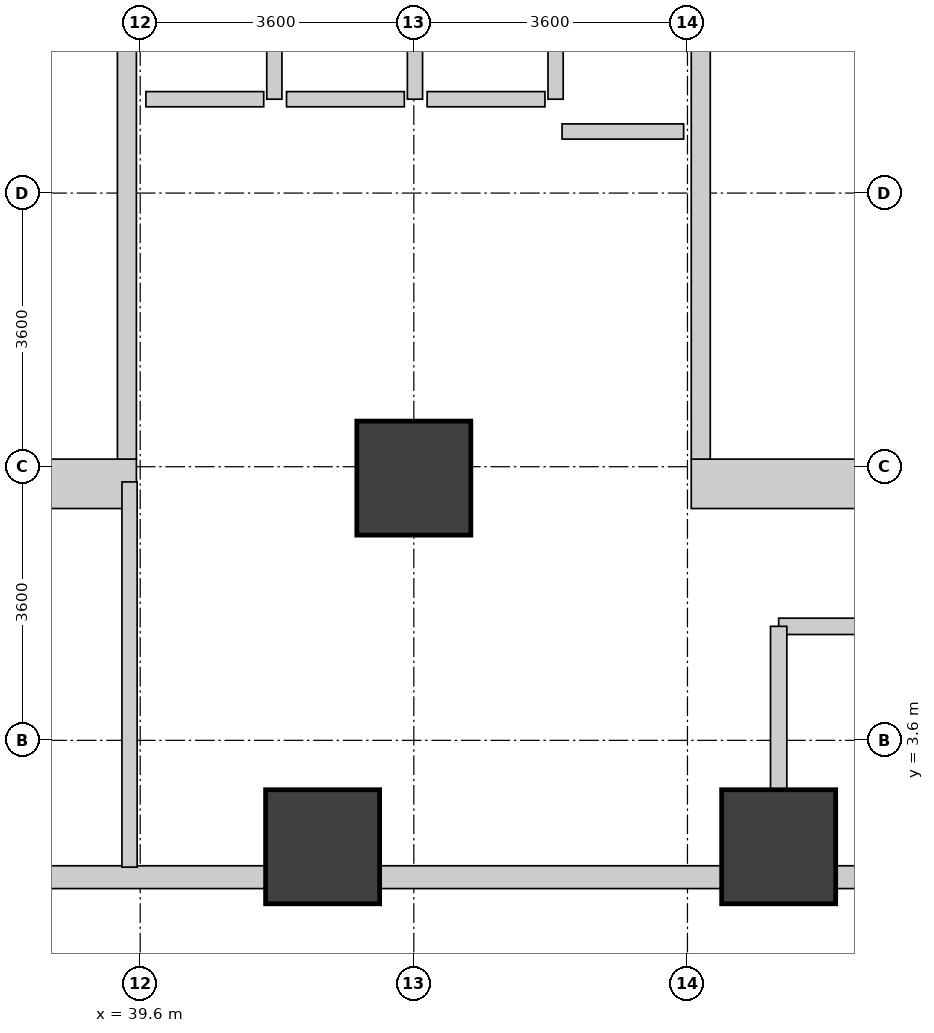
"""IFC4 building model, lengths in metres.
Left out: names, types, materials, properties, quantities, classifications, styles, units other than length and angle.
Written with IfcOpenShell. Run it as: python <this file> out.ifc"""

import sys

from ifc_helpers import new_model, si_unit, direction, frame, frame_2d, origin, origin_2d, place, context, subcontext, project, spatial, rectangle, extrude, source, transform, mapped, element, fill, save


model = new_model("IFC4")
c1 = context("Model", 3, precision=1e-05, world=origin(), true_north=direction((0.0, 1.0)))
c2 = subcontext(c1, "Body", "Model", "MODEL_VIEW")
j1 = project(units=[si_unit("LENGTHUNIT", "METRE"), si_unit("PLANEANGLEUNIT", "RADIAN")], contexts=[c1])
p1 = place(None, origin())
s1 = spatial("IfcSite", under=j1, at=p1, CompositionType="ELEMENT")
p2 = place(p1, origin())
s2 = spatial("IfcBuilding", under=s1, at=p2, CompositionType="ELEMENT")
p3 = place(p2, origin())
s3 = spatial("IfcBuildingStorey", under=s2, at=p3, CompositionType="ELEMENT", Elevation=0.0)
p4 = place(p3, frame((36.35, 6.975, 0.0), z_axis=(0.0, 0.0, 1.0), x_axis=(1.0, 0.0, 0.0)))
e1 = element("IfcWall", 1, at=p4, inside=s3, PredefinedType="SHEAR", context=c2, shape_type="SweptSolid", body=[
    extrude(rectangle(XDim=3.2, YDim=0.65, at=frame_2d((1.6, 0.0))), origin(), (0.0, 0.0, 1.0), 5.12),
])
p5 = place(p4, frame((0.85, 0.0, 0.0)))
e2 = element("IfcOpeningElement", 2, at=p5, cuts=e1, PredefinedType="OPENING", context=c2, shape_type="SweptSolid", body=[
    extrude(rectangle(XDim=1.1, YDim=2.08, at=frame_2d((0.55, 1.04))), frame((0.0, 0.335, 0.0), z_axis=(0.0, -1.0, 0.0), x_axis=(1.0, 0.0, 0.0)), (0.0, 0.0, 1.0), 0.67),
])
p6 = place(p3, frame((46.85, 6.975, 0.0), z_axis=(0.0, 0.0, 1.0), x_axis=(1.0, 0.0, 0.0)))
e3 = element("IfcWall", 3, at=p6, inside=s3, PredefinedType="SHEAR", context=c2, shape_type="SweptSolid", body=[
    extrude(rectangle(XDim=3.2, YDim=0.65, at=frame_2d((1.6, 0.0))), origin(), (0.0, 0.0, 1.0), 5.12),
])
p7 = place(p3, frame((39.425, 7.3, 0.0), z_axis=(0.0, 0.0, 1.0), x_axis=(0.0, 1.0, 0.0)))
e4 = element("IfcWall", 4, at=p7, inside=s3, PredefinedType="SHEAR", context=c2, shape_type="SweptSolid", body=[
    extrude(rectangle(XDim=7.0, YDim=0.25, at=frame_2d((3.5, 0.0))), origin(), (0.0, 0.0, 1.0), 5.12),
])
p8 = place(p7, frame((0.15, 0.0, 0.0)))
e5 = element("IfcOpeningElement", 5, at=p8, cuts=e4, PredefinedType="OPENING", context=c2, shape_type="SweptSolid", body=[
    extrude(rectangle(XDim=1.1, YDim=2.08, at=frame_2d((0.55, 1.04))), frame((0.0, 0.135, 0.0), z_axis=(0.0, -1.0, 0.0), x_axis=(1.0, 0.0, 0.0)), (0.0, 0.0, 1.0), 0.27),
])
p9 = place(p3, frame((46.975, 7.3, 0.0), z_axis=(0.0, 0.0, 1.0), x_axis=(0.0, 1.0, 0.0)))
e6 = element("IfcWall", 6, at=p9, inside=s3, PredefinedType="SHEAR", context=c2, shape_type="SweptSolid", body=[
    extrude(rectangle(XDim=7.0, YDim=0.25, at=frame_2d((3.5, 0.0))), origin(), (0.0, 0.0, 1.0), 5.12),
])
p10 = place(p9, frame((0.15, 0.0, 0.0)))
e7 = element("IfcOpeningElement", 7, at=p10, cuts=e6, PredefinedType="OPENING", context=c2, shape_type="SweptSolid", body=[
    extrude(rectangle(XDim=1.1, YDim=2.08, at=frame_2d((0.55, 1.04))), frame((0.0, 0.135, 0.0), z_axis=(0.0, -1.0, 0.0), x_axis=(1.0, 0.0, 0.0)), (0.0, 0.0, 1.0), 0.27),
])
m1 = source(origin(), c2, "Body", "SweptSolid", [
    extrude(rectangle(XDim=1.5, YDim=1.5, at=origin_2d()), origin(), (0.0, 0.0, 1.0), 5.4),
])
for number, where, z_axis, x_axis in (
    (8, (43.2, 7.05, 0.0), (0.0, 0.0, 1.0), (1.0, 0.0, 0.0)),
    (9, (48.0, 2.2, 0.0), (0.0, 0.0, 1.0), (1.0, 0.0, 0.0)),
    (10, (42.0, 2.2, 0.0), (0.0, 0.0, 1.0), (1.0, 0.0, 0.0)),
):
    element("IfcColumn", number, at=place(p3, frame(where, z_axis=z_axis, x_axis=x_axis)), inside=s3, PredefinedType="COLUMN", context=c2, shape_type="MappedRepresentation", body=[
        mapped(m1, transform((0.0, 0.0, 0.0), x_axis=(1.0, 0.0, 0.0), y_axis=(0.0, 1.0, 0.0), z_axis=(0.0, 0.0, 1.0), scale=1.0)),
    ])
p11 = place(p3, frame((41.249, 1.8, 0.0), z_axis=(0.0, 0.0, 1.0), x_axis=(-1.0, 0.0, 0.0)))
e11 = element("IfcWall", 11, at=p11, inside=s3, PredefinedType="STANDARD", context=c2, shape_type="SweptSolid", body=[
    extrude(rectangle(XDim=4.498, YDim=0.3, at=frame_2d((2.249, 0.0))), origin(), (0.0, 0.0, 1.0), 5.1),
])
p12 = place(p11, frame((1.324, 0.0, 0.0)))
e12 = element("IfcOpeningElement", 12, at=p12, cuts=e11, PredefinedType="OPENING", context=c2, shape_type="SweptSolid", body=[
    extrude(rectangle(XDim=1.85, YDim=2.25, at=frame_2d((0.925, 1.125))), frame((0.0, 0.16, 0.0), z_axis=(0.0, -1.0, 0.0), x_axis=(1.0, 0.0, 0.0)), (0.0, 0.0, 1.0), 0.32),
])
p13 = place(p3, frame((47.249, 1.8, 0.0), z_axis=(0.0, 0.0, 1.0), x_axis=(-1.0, 0.0, 0.0)))
e13 = element("IfcWall", 13, at=p13, inside=s3, PredefinedType="STANDARD", context=c2, shape_type="SweptSolid", body=[
    extrude(rectangle(XDim=4.498, YDim=0.3, at=frame_2d((2.249, 0.0))), origin(), (0.0, 0.0, 1.0), 5.1),
])
p14 = place(p13, frame((1.049, 0.0, 0.9)))
e14 = element("IfcOpeningElement", 14, at=p14, cuts=e13, PredefinedType="OPENING", context=c2, shape_type="SweptSolid", body=[
    extrude(rectangle(XDim=2.4, YDim=2.5, at=frame_2d((1.2, 1.25))), frame((0.0, 0.16, 0.0), z_axis=(0.0, -1.0, 0.0), x_axis=(1.0, 0.0, 0.0)), (0.0, 0.0, 1.0), 0.32),
])
p15 = place(p3, frame((55.249, 1.8, 0.0), z_axis=(0.0, 0.0, 1.0), x_axis=(-1.0, 0.0, 0.0)))
e15 = element("IfcWall", 15, at=p15, inside=s3, PredefinedType="STANDARD", context=c2, shape_type="SweptSolid", body=[
    extrude(rectangle(XDim=6.498, YDim=0.3, at=frame_2d((3.249, 0.0))), origin(), (0.0, 0.0, 1.0), 5.1),
])
p16 = place(p15, frame((2.324, 0.0, 0.0)))
e16 = element("IfcOpeningElement", 16, at=p16, cuts=e15, PredefinedType="OPENING", context=c2, shape_type="SweptSolid", body=[
    extrude(rectangle(XDim=1.85, YDim=2.25, at=frame_2d((0.925, 1.125))), frame((0.0, 0.16, 0.0), z_axis=(0.0, -1.0, 0.0), x_axis=(1.0, 0.0, 0.0)), (0.0, 0.0, 1.0), 0.32),
])
p17 = place(p3, frame((39.675, 12.035, 0.0), z_axis=(0.0, 0.0, 1.0), x_axis=(1.0, 0.0, 0.0)))
e17 = element("IfcWall", 17, at=p17, inside=s3, PredefinedType="PARTITIONING", context=c2, shape_type="SweptSolid", body=[
    extrude(rectangle(XDim=1.55, YDim=0.2, at=frame_2d((0.775, 0.0))), origin(), (0.0, 0.0, 1.0), 5.1),
])
p18 = place(p17, frame((0.225, 0.0, 0.0)))
e18 = element("IfcOpeningElement", 18, at=p18, cuts=e17, PredefinedType="OPENING", context=c2, shape_type="SweptSolid", body=[
    extrude(rectangle(XDim=1.1, YDim=2.12, at=frame_2d((0.55, 1.06))), frame((0.0, 0.11, 0.0), z_axis=(0.0, -1.0, 0.0), x_axis=(1.0, 0.0, 0.0)), (0.0, 0.0, 1.0), 0.22),
])
p19 = place(p3, frame((41.365, 12.035, 0.0), z_axis=(0.0, 0.0, 1.0), x_axis=(0.0, 1.0, 0.0)))
e19 = element("IfcWall", 19, at=p19, inside=s3, PredefinedType="PARTITIONING", context=c2, shape_type="SweptSolid", body=[
    extrude(rectangle(XDim=1.83, YDim=0.2, at=frame_2d((0.915, 0.0))), origin(), (0.0, 0.0, 1.0), 5.1),
])
p20 = place(p3, frame((41.525, 12.035, 0.0), z_axis=(0.0, 0.0, 1.0), x_axis=(1.0, 0.0, 0.0)))
e20 = element("IfcWall", 20, at=p20, inside=s3, PredefinedType="PARTITIONING", context=c2, shape_type="SweptSolid", body=[
    extrude(rectangle(XDim=1.55, YDim=0.2, at=frame_2d((0.775, 0.0))), origin(), (0.0, 0.0, 1.0), 5.1),
])
p21 = place(p20, frame((0.225, 0.0, 0.0)))
e21 = element("IfcOpeningElement", 21, at=p21, cuts=e20, PredefinedType="OPENING", context=c2, shape_type="SweptSolid", body=[
    extrude(rectangle(XDim=1.1, YDim=2.12, at=frame_2d((0.55, 1.06))), frame((0.0, 0.11, 0.0), z_axis=(0.0, -1.0, 0.0), x_axis=(1.0, 0.0, 0.0)), (0.0, 0.0, 1.0), 0.22),
])
p22 = place(p3, frame((43.215, 12.035, 0.0), z_axis=(0.0, 0.0, 1.0), x_axis=(0.0, 1.0, 0.0)))
e22 = element("IfcWall", 22, at=p22, inside=s3, PredefinedType="PARTITIONING", context=c2, shape_type="SweptSolid", body=[
    extrude(rectangle(XDim=1.83, YDim=0.2, at=frame_2d((0.915, 0.0))), origin(), (0.0, 0.0, 1.0), 5.1),
])
p23 = place(p3, frame((43.375, 12.035, 0.0), z_axis=(0.0, 0.0, 1.0), x_axis=(1.0, 0.0, 0.0)))
e23 = element("IfcWall", 23, at=p23, inside=s3, PredefinedType="PARTITIONING", context=c2, shape_type="SweptSolid", body=[
    extrude(rectangle(XDim=1.55, YDim=0.2, at=frame_2d((0.775, 0.0))), origin(), (0.0, 0.0, 1.0), 5.1),
])
p24 = place(p23, frame((0.225, 0.0, 0.0)))
e24 = element("IfcOpeningElement", 24, at=p24, cuts=e23, PredefinedType="OPENING", context=c2, shape_type="SweptSolid", body=[
    extrude(rectangle(XDim=1.1, YDim=2.12, at=frame_2d((0.55, 1.06))), frame((0.0, 0.11, 0.0), z_axis=(0.0, -1.0, 0.0), x_axis=(1.0, 0.0, 0.0)), (0.0, 0.0, 1.0), 0.22),
])
p25 = place(p3, frame((45.065, 12.035, 0.0), z_axis=(0.0, 0.0, 1.0), x_axis=(0.0, 1.0, 0.0)))
e25 = element("IfcWall", 25, at=p25, inside=s3, PredefinedType="PARTITIONING", context=c2, shape_type="SweptSolid", body=[
    extrude(rectangle(XDim=1.83, YDim=0.2, at=frame_2d((0.915, 0.0))), origin(), (0.0, 0.0, 1.0), 5.1),
])
p26 = place(p3, frame((45.15, 11.61, 0.0), z_axis=(0.0, 0.0, 1.0), x_axis=(1.0, 0.0, 0.0)))
e26 = element("IfcWall", 26, at=p26, inside=s3, PredefinedType="PARTITIONING", context=c2, shape_type="SweptSolid", body=[
    extrude(rectangle(XDim=1.6, YDim=0.2, at=frame_2d((0.8, 0.0))), origin(), (0.0, 0.0, 1.0), 5.1),
])
p27 = place(p26, frame((0.25, 0.0, 0.0)))
e27 = element("IfcOpeningElement", 27, at=p27, cuts=e26, PredefinedType="OPENING", context=c2, shape_type="SweptSolid", body=[
    extrude(rectangle(XDim=1.1, YDim=2.12, at=frame_2d((0.55, 1.06))), frame((0.0, 0.11, 0.0), z_axis=(0.0, -1.0, 0.0), x_axis=(1.0, 0.0, 0.0)), (0.0, 0.0, 1.0), 0.22),
])
p28 = place(p3, frame((39.46, 1.932, 0.0), z_axis=(0.0, 0.0, 1.0), x_axis=(0.0, 1.0, 0.0)))
e28 = element("IfcWall", 28, at=p28, inside=s3, PredefinedType="PARTITIONING", context=c2, shape_type="SweptSolid", body=[
    extrude(rectangle(XDim=5.068, YDim=0.2, at=frame_2d((2.534, 0.0))), origin(), (0.0, 0.0, 1.0), 5.1),
])
p29 = place(p3, frame((48.0, 5.1, 0.0), z_axis=(0.0, 0.0, 1.0), x_axis=(1.0, 0.0, 0.0)))
e29 = element("IfcWall", 29, at=p29, inside=s3, PredefinedType="PARTITIONING", context=c2, shape_type="SweptSolid", body=[
    extrude(rectangle(XDim=13.2, YDim=0.215, at=frame_2d((6.6, 0.0))), origin(), (0.0, 0.0, 1.0), 5.1),
])
p30 = place(p29, frame((3.524, 0.0, 0.0)))
e30 = element("IfcOpeningElement", 30, at=p30, cuts=e29, PredefinedType="OPENING", context=c2, shape_type="SweptSolid", body=[
    extrude(rectangle(XDim=1.4, YDim=2.15, at=frame_2d((0.7, 1.075))), frame((0.0, 0.118, 0.0), z_axis=(0.0, -1.0, 0.0), x_axis=(1.0, 0.0, 0.0)), (0.0, 0.0, 1.0), 0.235),
])
p31 = place(p3, frame((48.0, 2.95, 0.0), z_axis=(0.0, 0.0, 1.0), x_axis=(0.0, 1.0, 0.0)))
e31 = element("IfcWall", 31, at=p31, inside=s3, PredefinedType="PARTITIONING", context=c2, shape_type="SweptSolid", body=[
    extrude(rectangle(XDim=2.15, YDim=0.215, at=frame_2d((1.075, 0.0))), origin(), (0.0, 0.0, 1.0), 5.1),
])
p32 = place(p12, origin())
e32 = element("IfcDoor", 32, at=p32, inside=s3, OperationType="DOUBLE_DOOR_SINGLE_SWING", PredefinedType="DOOR", context=c2, shape_type="SweptSolid", body=[
    extrude(rectangle(XDim=1.85, YDim=2.25, at=frame_2d((0.925, 1.125))), frame((0.0, 0.025, 0.0), z_axis=(0.0, -1.0, 0.0), x_axis=(1.0, 0.0, 0.0)), (0.0, 0.0, 1.0), 0.05),
])
fill(e12, e32)
p33 = place(p14, origin())
e33 = element("IfcWindow", 33, at=p33, inside=s3, PartitioningType="SINGLE_PANEL", PredefinedType="WINDOW", context=c2, shape_type="SweptSolid", body=[
    extrude(rectangle(XDim=2.4, YDim=2.5, at=frame_2d((1.2, 1.25))), frame((0.0, 0.03, 0.0), z_axis=(0.0, -1.0, 0.0), x_axis=(1.0, 0.0, 0.0)), (0.0, 0.0, 1.0), 0.06),
])
fill(e14, e33)
p34 = place(p8, origin())
e34 = element("IfcDoor", 34, at=p34, inside=s3, OperationType="SINGLE_SWING_RIGHT", PredefinedType="DOOR", context=c2, shape_type="SweptSolid", body=[
    extrude(rectangle(XDim=1.1, YDim=2.08, at=frame_2d((0.55, 1.04))), frame((0.0, 0.025, 0.0), z_axis=(0.0, -1.0, 0.0), x_axis=(1.0, 0.0, 0.0)), (0.0, 0.0, 1.0), 0.05),
])
fill(e5, e34)
p35 = place(p10, origin())
e35 = element("IfcDoor", 35, at=p35, inside=s3, OperationType="SINGLE_SWING_LEFT", PredefinedType="DOOR", context=c2, shape_type="SweptSolid", body=[
    extrude(rectangle(XDim=1.1, YDim=2.08, at=frame_2d((0.55, 1.04))), frame((0.0, 0.025, 0.0), z_axis=(0.0, -1.0, 0.0), x_axis=(1.0, 0.0, 0.0)), (0.0, 0.0, 1.0), 0.05),
])
fill(e7, e35)
p36 = place(p18, origin())
e36 = element("IfcDoor", 36, at=p36, inside=s3, OperationType="SLIDING_TO_LEFT", PredefinedType="DOOR", context=c2, shape_type="SweptSolid", body=[
    extrude(rectangle(XDim=1.1, YDim=2.12, at=frame_2d((0.55, 1.06))), frame((0.0, 0.025, 0.0), z_axis=(0.0, -1.0, 0.0), x_axis=(1.0, 0.0, 0.0)), (0.0, 0.0, 1.0), 0.05),
])
fill(e18, e36)
p37 = place(p21, origin())
e37 = element("IfcDoor", 37, at=p37, inside=s3, OperationType="SLIDING_TO_LEFT", PredefinedType="DOOR", context=c2, shape_type="SweptSolid", body=[
    extrude(rectangle(XDim=1.1, YDim=2.12, at=frame_2d((0.55, 1.06))), frame((0.0, 0.025, 0.0), z_axis=(0.0, -1.0, 0.0), x_axis=(1.0, 0.0, 0.0)), (0.0, 0.0, 1.0), 0.05),
])
fill(e21, e37)
p38 = place(p24, origin())
e38 = element("IfcDoor", 38, at=p38, inside=s3, OperationType="SLIDING_TO_LEFT", PredefinedType="DOOR", context=c2, shape_type="SweptSolid", body=[
    extrude(rectangle(XDim=1.1, YDim=2.12, at=frame_2d((0.55, 1.06))), frame((0.0, 0.025, 0.0), z_axis=(0.0, -1.0, 0.0), x_axis=(1.0, 0.0, 0.0)), (0.0, 0.0, 1.0), 0.05),
])
fill(e24, e38)
p39 = place(p27, origin())
e39 = element("IfcDoor", 39, at=p39, inside=s3, OperationType="SLIDING_TO_LEFT", PredefinedType="DOOR", context=c2, shape_type="SweptSolid", body=[
    extrude(rectangle(XDim=1.1, YDim=2.12, at=frame_2d((0.55, 1.06))), frame((0.0, 0.025, 0.0), z_axis=(0.0, -1.0, 0.0), x_axis=(1.0, 0.0, 0.0)), (0.0, 0.0, 1.0), 0.05),
])
fill(e27, e39)
save(model, sys.argv[1])
